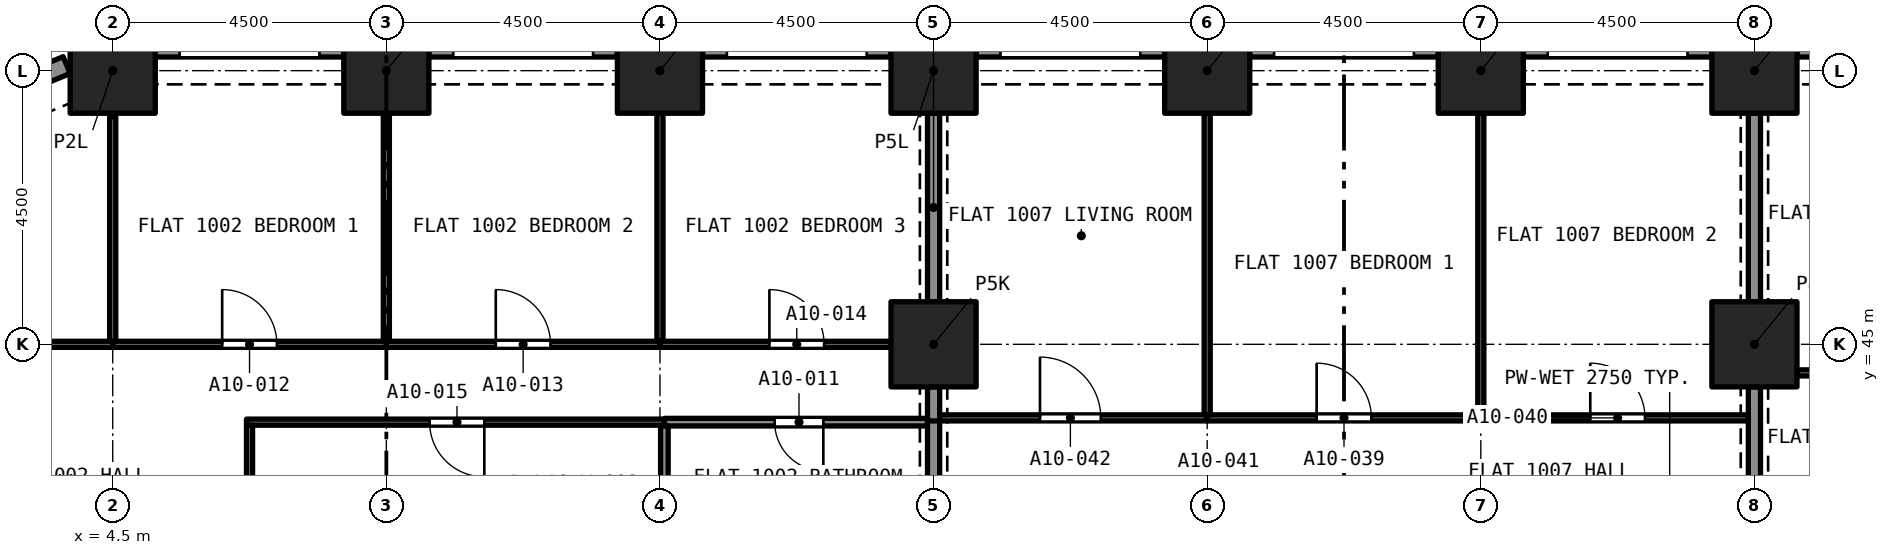
"""IFC4 building model, lengths in metres.
Left out: names, types, materials, properties, quantities, classifications, styles, units other than length and angle.
Written with IfcOpenShell. Run it as: python <this file> out.ifc"""

import sys

from ifc_helpers import new_model, si_unit, direction, frame, frame_2d, origin, origin_2d, place, context, subcontext, project, spatial, rectangle, extrude, element, fill, save


model = new_model("IFC4")
c1 = context("Model", 3, precision=1e-05, world=origin(), true_north=direction((0.0, 1.0)))
c2 = subcontext(c1, "Body", "Model", "MODEL_VIEW")
j1 = project(units=[si_unit("LENGTHUNIT", "METRE"), si_unit("PLANEANGLEUNIT", "RADIAN")], contexts=[c1])
p1 = place(None, origin())
s1 = spatial("IfcSite", under=j1, at=p1, CompositionType="ELEMENT")
p2 = place(p1, origin())
s2 = spatial("IfcBuilding", under=s1, at=p2, CompositionType="ELEMENT")
p3 = place(p2, frame((0.0, 0.0, 43.2)))
s3 = spatial("IfcBuildingStorey", under=s2, at=p3, CompositionType="ELEMENT", Elevation=43.2)
for number, where, z_axis, x_axis in (
    (1, (18.0, 45.0, 0.0), (0.0, 0.0, 1.0), (1.0, 0.0, 0.0)),
    (2, (31.5, 45.0, 0.0), (0.0, 0.0, 1.0), (1.0, 0.0, 0.0)),
    (3, (4.5, 49.5, 0.0), (0.0, 0.0, 1.0), (1.0, 0.0, 0.0)),
    (4, (9.0, 49.5, 0.0), (0.0, 0.0, 1.0), (1.0, 0.0, 0.0)),
    (5, (13.5, 49.5, 0.0), (0.0, 0.0, 1.0), (1.0, 0.0, 0.0)),
    (6, (18.0, 49.5, 0.0), (0.0, 0.0, 1.0), (1.0, 0.0, 0.0)),
    (7, (22.5, 49.5, 0.0), (0.0, 0.0, 1.0), (1.0, 0.0, 0.0)),
    (8, (27.0, 49.5, 0.0), (0.0, 0.0, 1.0), (1.0, 0.0, 0.0)),
    (9, (31.5, 49.5, 0.0), (0.0, 0.0, 1.0), (1.0, 0.0, 0.0)),
):
    element("IfcColumn", number, at=place(p3, frame(where, z_axis=z_axis, x_axis=x_axis)), inside=s3, PredefinedType="COLUMN", context=c2, shape_type="SweptSolid", body=[
        extrude(rectangle(XDim=1.4, YDim=1.4, at=origin_2d()), origin(), (0.0, 0.0, 1.0), 3.2),
    ])
p4 = place(p3, frame((32.2, 49.875, 0.0), z_axis=(0.0, 0.0, 1.0), x_axis=(1.0, 0.0, 0.0)))
e10 = element("IfcWall", 10, at=p4, inside=s3, PredefinedType="SOLIDWALL", context=c2, shape_type="SweptSolid", body=[
    extrude(rectangle(XDim=3.1, YDim=0.3, at=frame_2d((1.55, 0.0))), origin(), (0.0, 0.0, 1.0), 3.2),
])
p5 = place(p4, frame((0.4, 0.0, 0.45)))
e11 = element("IfcOpeningElement", 11, at=p5, cuts=e10, PredefinedType="OPENING", context=c2, shape_type="SweptSolid", body=[
    extrude(rectangle(XDim=2.3, YDim=1.95, at=frame_2d((1.15, 0.975))), frame((0.0, 0.16, 0.0), z_axis=(0.0, -1.0, 0.0), x_axis=(1.0, 0.0, 0.0)), (0.0, 0.0, 1.0), 0.32),
])
p6 = place(p3, frame((27.7, 49.875, 0.0), z_axis=(0.0, 0.0, 1.0), x_axis=(1.0, 0.0, 0.0)))
e12 = element("IfcWall", 12, at=p6, inside=s3, PredefinedType="SOLIDWALL", context=c2, shape_type="SweptSolid", body=[
    extrude(rectangle(XDim=3.1, YDim=0.3, at=frame_2d((1.55, 0.0))), origin(), (0.0, 0.0, 1.0), 3.2),
])
p7 = place(p6, frame((0.4, 0.0, 0.45)))
e13 = element("IfcOpeningElement", 13, at=p7, cuts=e12, PredefinedType="OPENING", context=c2, shape_type="SweptSolid", body=[
    extrude(rectangle(XDim=2.3, YDim=1.95, at=frame_2d((1.15, 0.975))), frame((0.0, 0.16, 0.0), z_axis=(0.0, -1.0, 0.0), x_axis=(1.0, 0.0, 0.0)), (0.0, 0.0, 1.0), 0.32),
])
p8 = place(p3, frame((23.2, 49.875, 0.0), z_axis=(0.0, 0.0, 1.0), x_axis=(1.0, 0.0, 0.0)))
e14 = element("IfcWall", 14, at=p8, inside=s3, PredefinedType="SOLIDWALL", context=c2, shape_type="SweptSolid", body=[
    extrude(rectangle(XDim=3.1, YDim=0.3, at=frame_2d((1.55, 0.0))), origin(), (0.0, 0.0, 1.0), 3.2),
])
p9 = place(p8, frame((0.4, 0.0, 0.45)))
e15 = element("IfcOpeningElement", 15, at=p9, cuts=e14, PredefinedType="OPENING", context=c2, shape_type="SweptSolid", body=[
    extrude(rectangle(XDim=2.3, YDim=1.95, at=frame_2d((1.15, 0.975))), frame((0.0, 0.16, 0.0), z_axis=(0.0, -1.0, 0.0), x_axis=(1.0, 0.0, 0.0)), (0.0, 0.0, 1.0), 0.32),
])
p10 = place(p3, frame((18.7, 49.875, 0.0), z_axis=(0.0, 0.0, 1.0), x_axis=(1.0, 0.0, 0.0)))
e16 = element("IfcWall", 16, at=p10, inside=s3, PredefinedType="SOLIDWALL", context=c2, shape_type="SweptSolid", body=[
    extrude(rectangle(XDim=3.1, YDim=0.3, at=frame_2d((1.55, 0.0))), origin(), (0.0, 0.0, 1.0), 3.2),
])
p11 = place(p10, frame((0.4, 0.0, 0.45)))
e17 = element("IfcOpeningElement", 17, at=p11, cuts=e16, PredefinedType="OPENING", context=c2, shape_type="SweptSolid", body=[
    extrude(rectangle(XDim=2.3, YDim=1.95, at=frame_2d((1.15, 0.975))), frame((0.0, 0.16, 0.0), z_axis=(0.0, -1.0, 0.0), x_axis=(1.0, 0.0, 0.0)), (0.0, 0.0, 1.0), 0.32),
])
p12 = place(p3, frame((14.2, 49.875, 0.0), z_axis=(0.0, 0.0, 1.0), x_axis=(1.0, 0.0, 0.0)))
e18 = element("IfcWall", 18, at=p12, inside=s3, PredefinedType="SOLIDWALL", context=c2, shape_type="SweptSolid", body=[
    extrude(rectangle(XDim=3.1, YDim=0.3, at=frame_2d((1.55, 0.0))), origin(), (0.0, 0.0, 1.0), 3.2),
])
p13 = place(p12, frame((0.4, 0.0, 0.45)))
e19 = element("IfcOpeningElement", 19, at=p13, cuts=e18, PredefinedType="OPENING", context=c2, shape_type="SweptSolid", body=[
    extrude(rectangle(XDim=2.3, YDim=1.95, at=frame_2d((1.15, 0.975))), frame((0.0, 0.16, 0.0), z_axis=(0.0, -1.0, 0.0), x_axis=(1.0, 0.0, 0.0)), (0.0, 0.0, 1.0), 0.32),
])
p14 = place(p3, frame((9.7, 49.875, 0.0), z_axis=(0.0, 0.0, 1.0), x_axis=(1.0, 0.0, 0.0)))
e20 = element("IfcWall", 20, at=p14, inside=s3, PredefinedType="SOLIDWALL", context=c2, shape_type="SweptSolid", body=[
    extrude(rectangle(XDim=3.1, YDim=0.3, at=frame_2d((1.55, 0.0))), origin(), (0.0, 0.0, 1.0), 3.2),
])
p15 = place(p14, frame((0.4, 0.0, 0.45)))
e21 = element("IfcOpeningElement", 21, at=p15, cuts=e20, PredefinedType="OPENING", context=c2, shape_type="SweptSolid", body=[
    extrude(rectangle(XDim=2.3, YDim=1.95, at=frame_2d((1.15, 0.975))), frame((0.0, 0.16, 0.0), z_axis=(0.0, -1.0, 0.0), x_axis=(1.0, 0.0, 0.0)), (0.0, 0.0, 1.0), 0.32),
])
p16 = place(p3, frame((5.2, 49.875, 0.0), z_axis=(0.0, 0.0, 1.0), x_axis=(1.0, 0.0, 0.0)))
e22 = element("IfcWall", 22, at=p16, inside=s3, PredefinedType="SOLIDWALL", context=c2, shape_type="SweptSolid", body=[
    extrude(rectangle(XDim=3.1, YDim=0.3, at=frame_2d((1.55, 0.0))), origin(), (0.0, 0.0, 1.0), 3.2),
])
p17 = place(p16, frame((0.4, 0.0, 0.45)))
e23 = element("IfcOpeningElement", 23, at=p17, cuts=e22, PredefinedType="OPENING", context=c2, shape_type="SweptSolid", body=[
    extrude(rectangle(XDim=2.3, YDim=1.95, at=frame_2d((1.15, 0.975))), frame((0.0, 0.16, 0.0), z_axis=(0.0, -1.0, 0.0), x_axis=(1.0, 0.0, 0.0)), (0.0, 0.0, 1.0), 0.32),
])
p18 = place(p3, frame((2.02, 48.878, 0.0), z_axis=(0.0, 0.0, 1.0), x_axis=(0.923903565336, 0.38262540684, 0.0)))
e24 = element("IfcWall", 24, at=p18, inside=s3, PredefinedType="SOLIDWALL", context=c2, shape_type="SweptSolid", body=[
    extrude(rectangle(XDim=1.865, YDim=0.3, at=frame_2d((0.933, 0.0))), origin(), (0.0, 0.0, 1.0), 3.2),
])
p19 = place(p18, frame((0.258, 0.0, 0.45)))
e25 = element("IfcOpeningElement", 25, at=p19, cuts=e24, PredefinedType="OPENING", context=c2, shape_type="SweptSolid", body=[
    extrude(rectangle(XDim=1.1, YDim=1.95, at=frame_2d((0.55, 0.975))), frame((0.0, 0.16, 0.0), z_axis=(0.0, -1.0, 0.0), x_axis=(1.0, 0.0, 0.0)), (0.0, 0.0, 1.0), 0.32),
])
p20 = place(p3, frame((17.9, 43.72, 0.0), z_axis=(0.0, 0.0, 1.0), x_axis=(-1.0, 0.0, 0.0)))
e26 = element("IfcWall", 26, at=p20, inside=s3, PredefinedType="PARTITIONING", context=c2, shape_type="SweptSolid", body=[
    extrude(rectangle(XDim=4.327, YDim=0.125, at=frame_2d((2.163, 0.0))), origin(), (0.0, 0.0, 1.0), 2.9),
])
p21 = place(p20, frame((1.713, 0.0, 0.0)))
e27 = element("IfcOpeningElement", 27, at=p21, cuts=e26, PredefinedType="OPENING", context=c2, shape_type="SweptSolid", body=[
    extrude(rectangle(XDim=0.8, YDim=2.1, at=frame_2d((0.4, 1.05))), frame((0.0, 0.073, 0.0), z_axis=(0.0, -1.0, 0.0), x_axis=(1.0, 0.0, 0.0)), (0.0, 0.0, 1.0), 0.145),
])
p22 = place(p3, frame((13.573, 40.575, 0.0), z_axis=(0.0, 0.0, 1.0), x_axis=(0.0, 1.0, 0.0)))
e28 = element("IfcWall", 28, at=p22, inside=s3, PredefinedType="PARTITIONING", context=c2, shape_type="SweptSolid", body=[
    extrude(rectangle(XDim=3.083, YDim=0.125, at=frame_2d((1.541, 0.0))), origin(), (0.0, 0.0, 1.0), 2.9),
])
p23 = place(p3, frame((18.0, 41.2, 0.0), z_axis=(0.0, 0.0, 1.0), x_axis=(0.0, 1.0, 0.0)))
e29 = element("IfcWall", 29, at=p23, inside=s3, PredefinedType="PARTITIONING", context=c2, shape_type="SweptSolid", body=[
    extrude(rectangle(XDim=2.583, YDim=0.2, at=frame_2d((1.291, 0.0))), origin(), (0.0, 0.0, 1.0), 2.38),
])
p24 = place(p3, frame((9.0, 45.05, 0.0), z_axis=(0.0, 0.0, 1.0), x_axis=(0.0, 1.0, 0.0)))
e30 = element("IfcWall", 30, at=p24, inside=s3, PredefinedType="PARTITIONING", context=c2, shape_type="SweptSolid", body=[
    extrude(rectangle(XDim=3.75, YDim=0.1, at=frame_2d((1.875, 0.0))), origin(), (0.0, 0.0, 1.0), 2.9),
])
p25 = place(p3, frame((4.5, 45.0, 0.0), z_axis=(0.0, 0.0, 1.0), x_axis=(1.0, 0.0, 0.0)))
e31 = element("IfcWall", 31, at=p25, inside=s3, PredefinedType="PARTITIONING", context=c2, shape_type="SweptSolid", body=[
    extrude(rectangle(XDim=4.5, YDim=0.1, at=frame_2d((2.25, 0.0))), origin(), (0.0, 0.0, 1.0), 2.9),
])
p26 = place(p25, frame((1.8, 0.0, 0.0)))
e32 = element("IfcOpeningElement", 32, at=p26, cuts=e31, PredefinedType="OPENING", context=c2, shape_type="SweptSolid", body=[
    extrude(rectangle(XDim=0.9, YDim=2.1, at=frame_2d((0.45, 1.05))), frame((0.0, 0.06, 0.0), z_axis=(0.0, -1.0, 0.0), x_axis=(1.0, 0.0, 0.0)), (0.0, 0.0, 1.0), 0.12),
])
p27 = place(p3, frame((4.5, 45.05, 0.0), z_axis=(0.0, 0.0, 1.0), x_axis=(0.0, 1.0, 0.0)))
e33 = element("IfcWall", 33, at=p27, inside=s3, PredefinedType="PARTITIONING", context=c2, shape_type="SweptSolid", body=[
    extrude(rectangle(XDim=3.692, YDim=0.1, at=frame_2d((1.846, 0.0))), origin(), (0.0, 0.0, 1.0), 2.9),
])
p28 = place(p3, frame((13.5, 45.05, 0.0), z_axis=(0.0, 0.0, 1.0), x_axis=(0.0, 1.0, 0.0)))
e34 = element("IfcWall", 34, at=p28, inside=s3, PredefinedType="PARTITIONING", context=c2, shape_type="SweptSolid", body=[
    extrude(rectangle(XDim=3.75, YDim=0.1, at=frame_2d((1.875, 0.0))), origin(), (0.0, 0.0, 1.0), 2.9),
])
p29 = place(p3, frame((9.0, 45.0, 0.0), z_axis=(0.0, 0.0, 1.0), x_axis=(1.0, 0.0, 0.0)))
e35 = element("IfcWall", 35, at=p29, inside=s3, PredefinedType="PARTITIONING", context=c2, shape_type="SweptSolid", body=[
    extrude(rectangle(XDim=4.5, YDim=0.1, at=frame_2d((2.25, 0.0))), origin(), (0.0, 0.0, 1.0), 2.9),
])
p30 = place(p29, frame((1.8, 0.0, 0.0)))
e36 = element("IfcOpeningElement", 36, at=p30, cuts=e35, PredefinedType="OPENING", context=c2, shape_type="SweptSolid", body=[
    extrude(rectangle(XDim=0.9, YDim=2.1, at=frame_2d((0.45, 1.05))), frame((0.0, 0.06, 0.0), z_axis=(0.0, -1.0, 0.0), x_axis=(1.0, 0.0, 0.0)), (0.0, 0.0, 1.0), 0.12),
])
p31 = place(p3, frame((13.5, 45.0, 0.0), z_axis=(0.0, 0.0, 1.0), x_axis=(1.0, 0.0, 0.0)))
e37 = element("IfcWall", 37, at=p31, inside=s3, PredefinedType="PARTITIONING", context=c2, shape_type="SweptSolid", body=[
    extrude(rectangle(XDim=3.8, YDim=0.1, at=frame_2d((1.9, 0.0))), origin(), (0.0, 0.0, 1.0), 2.9),
])
p32 = place(p31, frame((1.8, 0.0, 0.0)))
e38 = element("IfcOpeningElement", 38, at=p32, cuts=e37, PredefinedType="OPENING", context=c2, shape_type="SweptSolid", body=[
    extrude(rectangle(XDim=0.9, YDim=2.1, at=frame_2d((0.45, 1.05))), frame((0.0, 0.06, 0.0), z_axis=(0.0, -1.0, 0.0), x_axis=(1.0, 0.0, 0.0)), (0.0, 0.0, 1.0), 0.12),
])
p33 = place(p3, frame((18.0, 45.7, 0.0), z_axis=(0.0, 0.0, 1.0), x_axis=(0.0, 1.0, 0.0)))
e39 = element("IfcWall", 39, at=p33, inside=s3, PredefinedType="PARTITIONING", context=c2, shape_type="SweptSolid", body=[
    extrude(rectangle(XDim=3.1, YDim=0.2, at=frame_2d((1.55, 0.0))), origin(), (0.0, 0.0, 1.0), 2.38),
])
p34 = place(p3, frame((13.573, 43.72, 0.0), z_axis=(0.0, 0.0, 1.0), x_axis=(-1.0, 0.0, 0.0)))
e40 = element("IfcWall", 40, at=p34, inside=s3, PredefinedType="PARTITIONING", context=c2, shape_type="SweptSolid", body=[
    extrude(rectangle(XDim=6.873, YDim=0.1, at=frame_2d((3.437, 0.0))), origin(), (0.0, 0.0, 1.0), 2.9),
])
p35 = place(p34, frame((2.962, 0.0, 0.0)))
e41 = element("IfcOpeningElement", 41, at=p35, cuts=e40, PredefinedType="OPENING", context=c2, shape_type="SweptSolid", body=[
    extrude(rectangle(XDim=0.9, YDim=2.1, at=frame_2d((0.45, 1.05))), frame((0.0, 0.06, 0.0), z_axis=(0.0, -1.0, 0.0), x_axis=(1.0, 0.0, 0.0)), (0.0, 0.0, 1.0), 0.12),
])
p36 = place(p3, frame((6.75, 40.5, 0.0), z_axis=(0.0, 0.0, 1.0), x_axis=(0.0, 1.0, 0.0)))
e42 = element("IfcWall", 42, at=p36, inside=s3, PredefinedType="PARTITIONING", context=c2, shape_type="SweptSolid", body=[
    extrude(rectangle(XDim=3.17, YDim=0.1, at=frame_2d((1.585, 0.0))), origin(), (0.0, 0.0, 1.0), 2.9),
])
p37 = place(p3, frame((0.758, 45.0, 0.0), z_axis=(0.0, 0.0, 1.0), x_axis=(1.0, 0.0, 0.0)))
e43 = element("IfcWall", 43, at=p37, inside=s3, PredefinedType="PARTITIONING", context=c2, shape_type="SweptSolid", body=[
    extrude(rectangle(XDim=3.742, YDim=0.1, at=frame_2d((1.871, 0.0))), origin(), (0.0, 0.0, 1.0), 2.9),
])
p38 = place(p37, frame((1.342, 0.0, 0.0)))
e44 = element("IfcOpeningElement", 44, at=p38, cuts=e43, PredefinedType="OPENING", context=c2, shape_type="SweptSolid", body=[
    extrude(rectangle(XDim=1.0, YDim=2.1, at=frame_2d((0.5, 1.05))), frame((0.0, 0.06, 0.0), z_axis=(0.0, -1.0, 0.0), x_axis=(1.0, 0.0, 0.0)), (0.0, 0.0, 1.0), 0.12),
])
p39 = place(p3, frame((18.0, 43.74, 0.0), z_axis=(0.0, 0.0, 1.0), x_axis=(0.0, 1.0, 0.0)))
e45 = element("IfcWall", 45, at=p39, inside=s3, PredefinedType="PARTITIONING", context=c2, shape_type="SweptSolid", body=[
    extrude(rectangle(XDim=0.56, YDim=0.2, at=frame_2d((0.28, 0.0))), origin(), (0.0, 0.0, 1.0), 2.38),
])
p40 = place(p3, frame((32.2, 44.53, 0.0), z_axis=(0.0, 0.0, 1.0), x_axis=(1.0, 0.0, 0.0)))
e46 = element("IfcWall", 46, at=p40, inside=s3, PredefinedType="PARTITIONING", context=c2, shape_type="SweptSolid", body=[
    extrude(rectangle(XDim=3.8, YDim=0.1, at=frame_2d((1.9, 0.0))), origin(), (0.0, 0.0, 1.0), 2.9),
])
p41 = place(p40, frame((1.05, 0.0, 0.0)))
e47 = element("IfcOpeningElement", 47, at=p41, cuts=e46, PredefinedType="OPENING", context=c2, shape_type="SweptSolid", body=[
    extrude(rectangle(XDim=1.0, YDim=2.1, at=frame_2d((0.5, 1.05))), frame((0.0, 0.06, 0.0), z_axis=(0.0, -1.0, 0.0), x_axis=(1.0, 0.0, 0.0)), (0.0, 0.0, 1.0), 0.12),
])
for number, where, z_axis, x_axis in (
    (48, (31.5, 41.2, 0.0), (0.0, 0.0, 1.0), (0.0, 1.0, 0.0)),
    (49, (31.5, 45.7, 0.0), (0.0, 0.0, 1.0), (0.0, 1.0, 0.0)),
):
    element("IfcWall", number, at=place(p3, frame(where, z_axis=z_axis, x_axis=x_axis)), inside=s3, PredefinedType="PARTITIONING", context=c2, shape_type="SweptSolid", body=[
        extrude(rectangle(XDim=3.1, YDim=0.2, at=frame_2d((1.55, 0.0))), origin(), (0.0, 0.0, 1.0), 2.38),
    ])
p42 = place(p3, frame((27.0, 43.84, 0.0), z_axis=(0.0, 0.0, 1.0), x_axis=(0.0, 1.0, 0.0)))
e50 = element("IfcWall", 50, at=p42, inside=s3, PredefinedType="PARTITIONING", context=c2, shape_type="SweptSolid", body=[
    extrude(rectangle(XDim=4.96, YDim=0.1, at=frame_2d((2.48, 0.0))), origin(), (0.0, 0.0, 1.0), 2.75),
])
p43 = place(p3, frame((22.5, 43.79, 0.0), z_axis=(0.0, 0.0, 1.0), x_axis=(1.0, 0.0, 0.0)))
e51 = element("IfcWall", 51, at=p43, inside=s3, PredefinedType="PARTITIONING", context=c2, shape_type="SweptSolid", body=[
    extrude(rectangle(XDim=4.5, YDim=0.1, at=frame_2d((2.25, 0.0))), origin(), (0.0, 0.0, 1.0), 2.75),
])
p44 = place(p43, frame((1.8, 0.0, 0.0)))
e52 = element("IfcOpeningElement", 52, at=p44, cuts=e51, PredefinedType="OPENING", context=c2, shape_type="SweptSolid", body=[
    extrude(rectangle(XDim=0.9, YDim=2.1, at=frame_2d((0.45, 1.05))), frame((0.0, 0.06, 0.0), z_axis=(0.0, -1.0, 0.0), x_axis=(1.0, 0.0, 0.0)), (0.0, 0.0, 1.0), 0.12),
])
p45 = place(p3, frame((22.5, 43.84, 0.0), z_axis=(0.0, 0.0, 1.0), x_axis=(0.0, 1.0, 0.0)))
e53 = element("IfcWall", 53, at=p45, inside=s3, PredefinedType="PARTITIONING", context=c2, shape_type="SweptSolid", body=[
    extrude(rectangle(XDim=4.96, YDim=0.1, at=frame_2d((2.48, 0.0))), origin(), (0.0, 0.0, 1.0), 2.75),
])
p46 = place(p3, frame((27.0, 43.79, 0.0), z_axis=(0.0, 0.0, 1.0), x_axis=(1.0, 0.0, 0.0)))
e54 = element("IfcWall", 54, at=p46, inside=s3, PredefinedType="PARTITIONING", context=c2, shape_type="SweptSolid", body=[
    extrude(rectangle(XDim=4.4, YDim=0.1, at=frame_2d((2.2, 0.0))), origin(), (0.0, 0.0, 1.0), 2.75),
])
p47 = place(p46, frame((1.8, 0.0, 0.0)))
e55 = element("IfcOpeningElement", 55, at=p47, cuts=e54, PredefinedType="OPENING", context=c2, shape_type="SweptSolid", body=[
    extrude(rectangle(XDim=0.9, YDim=2.1, at=frame_2d((0.45, 1.05))), frame((0.0, 0.06, 0.0), z_axis=(0.0, -1.0, 0.0), x_axis=(1.0, 0.0, 0.0)), (0.0, 0.0, 1.0), 0.12),
])
p48 = place(p3, frame((18.1, 43.79, 0.0), z_axis=(0.0, 0.0, 1.0), x_axis=(1.0, 0.0, 0.0)))
e56 = element("IfcWall", 56, at=p48, inside=s3, PredefinedType="PARTITIONING", context=c2, shape_type="SweptSolid", body=[
    extrude(rectangle(XDim=4.4, YDim=0.1, at=frame_2d((2.2, 0.0))), origin(), (0.0, 0.0, 1.0), 2.75),
])
p49 = place(p48, frame((1.65, 0.0, 0.0)))
e57 = element("IfcOpeningElement", 57, at=p49, cuts=e56, PredefinedType="OPENING", context=c2, shape_type="SweptSolid", body=[
    extrude(rectangle(XDim=1.0, YDim=2.1, at=frame_2d((0.5, 1.05))), frame((0.0, 0.06, 0.0), z_axis=(0.0, -1.0, 0.0), x_axis=(1.0, 0.0, 0.0)), (0.0, 0.0, 1.0), 0.12),
])
p50 = place(p21, origin())
e58 = element("IfcDoor", 58, at=p50, inside=s3, OperationType="SINGLE_SWING_LEFT", PredefinedType="DOOR", context=c2, shape_type="SweptSolid", body=[
    extrude(rectangle(XDim=0.8, YDim=2.1, at=frame_2d((0.4, 1.05))), frame((0.0, 0.025, 0.0), z_axis=(0.0, -1.0, 0.0), x_axis=(1.0, 0.0, 0.0)), (0.0, 0.0, 1.0), 0.05),
])
fill(e27, e58)
p51 = place(p26, origin())
e59 = element("IfcDoor", 59, at=p51, inside=s3, OperationType="SINGLE_SWING_RIGHT", PredefinedType="DOOR", context=c2, shape_type="SweptSolid", body=[
    extrude(rectangle(XDim=0.9, YDim=2.1, at=frame_2d((0.45, 1.05))), frame((0.0, 0.025, 0.0), z_axis=(0.0, -1.0, 0.0), x_axis=(1.0, 0.0, 0.0)), (0.0, 0.0, 1.0), 0.05),
])
fill(e32, e59)
p52 = place(p30, origin())
e60 = element("IfcDoor", 60, at=p52, inside=s3, OperationType="SINGLE_SWING_LEFT", PredefinedType="DOOR", context=c2, shape_type="SweptSolid", body=[
    extrude(rectangle(XDim=0.9, YDim=2.1, at=frame_2d((0.45, 1.05))), frame((0.0, 0.025, 0.0), z_axis=(0.0, -1.0, 0.0), x_axis=(1.0, 0.0, 0.0)), (0.0, 0.0, 1.0), 0.05),
])
fill(e36, e60)
p53 = place(p32, origin())
e61 = element("IfcDoor", 61, at=p53, inside=s3, OperationType="SINGLE_SWING_RIGHT", PredefinedType="DOOR", context=c2, shape_type="SweptSolid", body=[
    extrude(rectangle(XDim=0.9, YDim=2.1, at=frame_2d((0.45, 1.05))), frame((0.0, 0.025, 0.0), z_axis=(0.0, -1.0, 0.0), x_axis=(1.0, 0.0, 0.0)), (0.0, 0.0, 1.0), 0.05),
])
fill(e38, e61)
p54 = place(p35, origin())
e62 = element("IfcDoor", 62, at=p54, inside=s3, OperationType="SINGLE_SWING_LEFT", PredefinedType="DOOR", context=c2, shape_type="SweptSolid", body=[
    extrude(rectangle(XDim=0.9, YDim=2.1, at=frame_2d((0.45, 1.05))), frame((0.0, 0.025, 0.0), z_axis=(0.0, -1.0, 0.0), x_axis=(1.0, 0.0, 0.0)), (0.0, 0.0, 1.0), 0.05),
])
fill(e41, e62)
p55 = place(p44, origin())
e63 = element("IfcDoor", 63, at=p55, inside=s3, OperationType="SINGLE_SWING_LEFT", PredefinedType="DOOR", context=c2, shape_type="SweptSolid", body=[
    extrude(rectangle(XDim=0.9, YDim=2.1, at=frame_2d((0.45, 1.05))), frame((0.0, 0.025, 0.0), z_axis=(0.0, -1.0, 0.0), x_axis=(1.0, 0.0, 0.0)), (0.0, 0.0, 1.0), 0.05),
])
fill(e52, e63)
p56 = place(p47, origin())
e64 = element("IfcDoor", 64, at=p56, inside=s3, OperationType="SINGLE_SWING_RIGHT", PredefinedType="DOOR", context=c2, shape_type="SweptSolid", body=[
    extrude(rectangle(XDim=0.9, YDim=2.1, at=frame_2d((0.45, 1.05))), frame((0.0, 0.025, 0.0), z_axis=(0.0, -1.0, 0.0), x_axis=(1.0, 0.0, 0.0)), (0.0, 0.0, 1.0), 0.05),
])
fill(e55, e64)
p57 = place(p49, origin())
e65 = element("IfcDoor", 65, at=p57, inside=s3, OperationType="SINGLE_SWING_LEFT", PredefinedType="DOOR", context=c2, shape_type="SweptSolid", body=[
    extrude(rectangle(XDim=1.0, YDim=2.1, at=frame_2d((0.5, 1.05))), frame((0.0, 0.025, 0.0), z_axis=(0.0, -1.0, 0.0), x_axis=(1.0, 0.0, 0.0)), (0.0, 0.0, 1.0), 0.05),
])
fill(e57, e65)
save(model, sys.argv[1])
